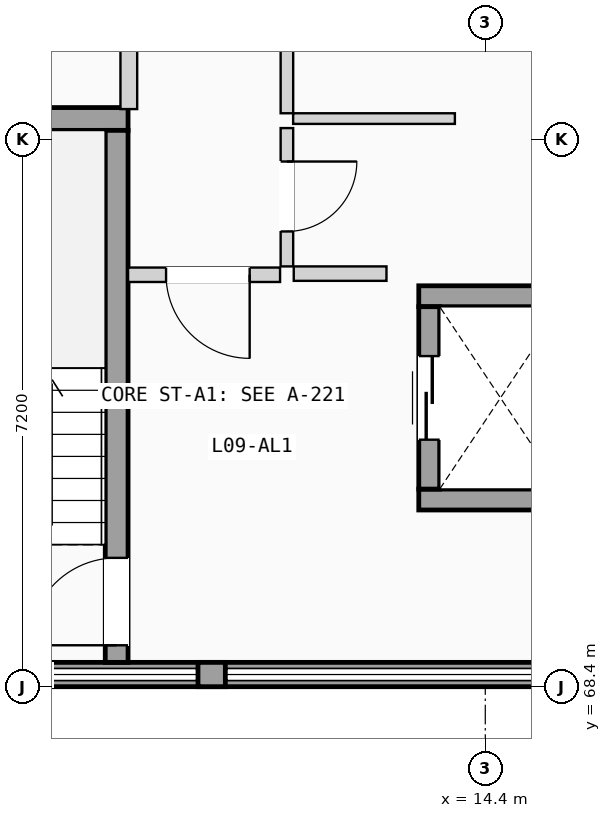
"""IFC4 building model, lengths in metres.
Left out: names, types, materials, properties, quantities, classifications, styles, units other than length and angle.
Written with IfcOpenShell. Run it as: python <this file> out.ifc"""

import sys

from ifc_helpers import new_model, si_unit, direction, frame, frame_2d, origin, place, context, subcontext, project, spatial, rectangle, extrude, element, fill, save


model = new_model("IFC4")
c1 = context("Model", 3, precision=1e-05, world=origin(), true_north=direction((0.0, 1.0)))
c2 = subcontext(c1, "Body", "Model", "MODEL_VIEW")
j1 = project(units=[si_unit("LENGTHUNIT", "METRE"), si_unit("PLANEANGLEUNIT", "RADIAN")], contexts=[c1])
p1 = place(None, origin())
s1 = spatial("IfcSite", under=j1, at=p1, CompositionType="ELEMENT")
p2 = place(p1, origin())
s2 = spatial("IfcBuilding", under=s1, at=p2, CompositionType="ELEMENT")
p3 = place(p2, frame((0.0, 0.0, 30.975)))
s3 = spatial("IfcBuildingStorey", under=s2, at=p3, CompositionType="ELEMENT", Elevation=30.975)
p4 = place(p3, frame((0.0, 68.56, 0.0), z_axis=(0.0, 0.0, 1.0), x_axis=(1.0, 0.0, 0.0)))
e1 = element("IfcWall", 1, at=p4, inside=s3, PredefinedType="SOLIDWALL", context=c2, shape_type="SweptSolid", body=[
    extrude(rectangle(XDim=21.6, YDim=0.32, at=frame_2d((10.8, 0.0))), origin(), (0.0, 0.0, 1.0), 1.11),
])
p5 = place(p3, frame((10.62, 68.56, 1.11), z_axis=(0.0, 0.0, 1.0), x_axis=(1.0, 0.0, 0.0)))
e2 = element("IfcWall", 2, at=p5, inside=s3, PredefinedType="SOLIDWALL", context=c2, shape_type="SweptSolid", body=[
    extrude(rectangle(XDim=0.36, YDim=0.32, at=frame_2d((0.18, 0.0))), origin(), (0.0, 0.0, 1.0), 1.79),
])
p6 = place(p3, frame((5.7, 75.87, 0.0), z_axis=(0.0, 0.0, 1.0), x_axis=(1.0, 0.0, 0.0)))
e3 = element("IfcWall", 3, at=p6, inside=s3, PredefinedType="SHEAR", context=c2, shape_type="SweptSolid", body=[
    extrude(rectangle(XDim=4.0, YDim=0.3, at=frame_2d((2.0, 0.0))), origin(), (0.0, 0.0, 1.0), 2.9),
])
p7 = place(p3, frame((9.55, 68.72, 0.0), z_axis=(0.0, 0.0, 1.0), x_axis=(0.0, 1.0, 0.0)))
e4 = element("IfcWall", 4, at=p7, inside=s3, PredefinedType="SHEAR", context=c2, shape_type="SweptSolid", body=[
    extrude(rectangle(XDim=7.0, YDim=0.3, at=frame_2d((3.5, 0.0))), origin(), (0.0, 0.0, 1.0), 2.9),
])
p8 = place(p7, frame((0.225, 0.0, 0.0)))
e5 = element("IfcOpeningElement", 5, at=p8, cuts=e4, PredefinedType="OPENING", context=c2, shape_type="SweptSolid", body=[
    extrude(rectangle(XDim=1.15, YDim=2.12, at=frame_2d((0.575, 1.06))), frame((0.0, 0.16, 0.0), z_axis=(0.0, -1.0, 0.0), x_axis=(1.0, 0.0, 0.0)), (0.0, 0.0, 1.0), 0.32),
])
for number, where, z_axis, x_axis in (
    (6, (13.525, 70.863, 0.0), (0.0, 0.0, 1.0), (1.0, 0.0, 0.0)),
    (7, (13.525, 73.538, 0.0), (0.0, 0.0, 1.0), (1.0, 0.0, 0.0)),
):
    element("IfcWall", number, at=place(p3, frame(where, z_axis=z_axis, x_axis=x_axis)), inside=s3, PredefinedType="SHEAR", context=c2, shape_type="SweptSolid", body=[
        extrude(rectangle(XDim=2.15, YDim=0.275, at=frame_2d((1.075, 0.0))), origin(), (0.0, 0.0, 1.0), 2.9),
    ])
p9 = place(p3, frame((13.663, 71.0, 0.0), z_axis=(0.0, 0.0, 1.0), x_axis=(0.0, 1.0, 0.0)))
e8 = element("IfcWall", 8, at=p9, inside=s3, PredefinedType="SHEAR", context=c2, shape_type="SweptSolid", body=[
    extrude(rectangle(XDim=2.4, YDim=0.275, at=frame_2d((1.2, 0.0))), origin(), (0.0, 0.0, 1.0), 2.9),
])
p10 = place(p9, frame((0.65, 0.0, 0.0)))
e9 = element("IfcOpeningElement", 9, at=p10, cuts=e8, PredefinedType="OPENING", context=c2, shape_type="SweptSolid", body=[
    extrude(rectangle(XDim=1.1, YDim=2.15, at=frame_2d((0.55, 1.075))), frame((0.0, 0.147, 0.0), z_axis=(0.0, -1.0, 0.0), x_axis=(1.0, 0.0, 0.0)), (0.0, 0.0, 1.0), 0.295),
])
p11 = place(p3, frame((11.88, 73.835, 0.0), z_axis=(0.0, 0.0, 1.0), x_axis=(1.0, 0.0, 0.0)))
e10 = element("IfcWall", 10, at=p11, inside=s3, PredefinedType="PARTITIONING", context=c2, shape_type="SweptSolid", body=[
    extrude(rectangle(XDim=1.22, YDim=0.19, at=frame_2d((0.61, 0.0))), origin(), (0.0, 0.0, 1.0), 2.87),
])
p12 = place(p3, frame((9.7, 73.82, 0.0), z_axis=(0.0, 0.0, 1.0), x_axis=(1.0, 0.0, 0.0)))
e11 = element("IfcWall", 11, at=p12, inside=s3, PredefinedType="PARTITIONING", context=c2, shape_type="SweptSolid", body=[
    extrude(rectangle(XDim=2.0, YDim=0.19, at=frame_2d((1.0, 0.0))), origin(), (0.0, 0.0, 1.0), 2.87),
])
p13 = place(p12, frame((0.5, 0.0, 0.0)))
e12 = element("IfcOpeningElement", 12, at=p13, cuts=e11, PredefinedType="OPENING", context=c2, shape_type="SweptSolid", body=[
    extrude(rectangle(XDim=1.1, YDim=2.12, at=frame_2d((0.55, 1.06))), frame((0.0, 0.105, 0.0), z_axis=(0.0, -1.0, 0.0), x_axis=(1.0, 0.0, 0.0)), (0.0, 0.0, 1.0), 0.21),
])
p14 = place(p3, frame((11.79, 73.93, 0.0), z_axis=(0.0, 0.0, 1.0), x_axis=(0.0, 1.0, 0.0)))
e13 = element("IfcWall", 13, at=p14, inside=s3, PredefinedType="PARTITIONING", context=c2, shape_type="SweptSolid", body=[
    extrude(rectangle(XDim=1.82, YDim=0.165, at=frame_2d((0.91, 0.0))), origin(), (0.0, 0.0, 1.0), 2.87),
])
p15 = place(p14, frame((0.46, 0.0, 0.0)))
e14 = element("IfcOpeningElement", 14, at=p15, cuts=e13, PredefinedType="OPENING", context=c2, shape_type="SweptSolid", body=[
    extrude(rectangle(XDim=0.92, YDim=2.04, at=frame_2d((0.46, 1.02))), frame((0.0, 0.093, 0.0), z_axis=(0.0, -1.0, 0.0), x_axis=(1.0, 0.0, 0.0)), (0.0, 0.0, 1.0), 0.185),
])
p16 = place(p3, frame((11.872, 75.875, 0.0), z_axis=(0.0, 0.0, 1.0), x_axis=(1.0, 0.0, 0.0)))
e15 = element("IfcWall", 15, at=p16, inside=s3, PredefinedType="PARTITIONING", context=c2, shape_type="SweptSolid", body=[
    extrude(rectangle(XDim=2.128, YDim=0.14, at=frame_2d((1.064, 0.0))), origin(), (0.0, 0.0, 1.0), 2.87),
])
p17 = place(p3, frame((9.71, 76.0, 0.0), z_axis=(0.0, 0.0, 1.0), x_axis=(0.0, 1.0, 0.0)))
e16 = element("IfcWall", 16, at=p17, inside=s3, PredefinedType="PLUMBINGWALL", context=c2, shape_type="SweptSolid", body=[
    extrude(rectangle(XDim=4.039, YDim=0.22, at=frame_2d((2.02, 0.0))), origin(), (0.0, 0.0, 1.0), 2.87),
])
p18 = place(p3, frame((11.79, 75.945, 0.0), z_axis=(0.0, 0.0, 1.0), x_axis=(0.0, 1.0, 0.0)))
e17 = element("IfcWall", 17, at=p18, inside=s3, PredefinedType="PARTITIONING", context=c2, shape_type="SweptSolid", body=[
    extrude(rectangle(XDim=6.608, YDim=0.165, at=frame_2d((3.304, 0.0))), origin(), (0.0, 0.0, 1.0), 2.87),
])
p19 = place(p18, frame((2.842, 0.0, 0.0)))
e18 = element("IfcOpeningElement", 18, at=p19, cuts=e17, PredefinedType="OPENING", context=c2, shape_type="SweptSolid", body=[
    extrude(rectangle(XDim=0.98, YDim=2.08, at=frame_2d((0.49, 1.04))), frame((0.0, 0.093, 0.0), z_axis=(0.0, -1.0, 0.0), x_axis=(1.0, 0.0, 0.0)), (0.0, 0.0, 1.0), 0.185),
])
p20 = place(p8, origin())
e19 = element("IfcDoor", 19, at=p20, inside=s3, OperationType="SINGLE_SWING_LEFT", PredefinedType="DOOR", context=c2, shape_type="SweptSolid", body=[
    extrude(rectangle(XDim=1.15, YDim=2.12, at=frame_2d((0.575, 1.06))), frame((0.0, 0.025, 0.0), z_axis=(0.0, -1.0, 0.0), x_axis=(1.0, 0.0, 0.0)), (0.0, 0.0, 1.0), 0.05),
])
fill(e5, e19)
p21 = place(p10, origin())
e20 = element("IfcDoor", 20, at=p21, inside=s3, OperationType="SLIDING_TO_LEFT", PredefinedType="DOOR", context=c2, shape_type="SweptSolid", body=[
    extrude(rectangle(XDim=1.1, YDim=2.15, at=frame_2d((0.55, 1.075))), frame((0.0, 0.025, 0.0), z_axis=(0.0, -1.0, 0.0), x_axis=(1.0, 0.0, 0.0)), (0.0, 0.0, 1.0), 0.05),
])
fill(e9, e20)
p22 = place(p13, frame((1.1, 0.0, 0.0), z_axis=(0.0, 0.0, 1.0), x_axis=(-1.0, 0.0, 0.0)))
e21 = element("IfcDoor", 21, at=p22, inside=s3, OperationType="SINGLE_SWING_RIGHT", PredefinedType="DOOR", context=c2, shape_type="SweptSolid", body=[
    extrude(rectangle(XDim=1.1, YDim=2.12, at=frame_2d((0.55, 1.06))), frame((0.0, 0.025, 0.0), z_axis=(0.0, -1.0, 0.0), x_axis=(1.0, 0.0, 0.0)), (0.0, 0.0, 1.0), 0.05),
])
fill(e12, e21)
p23 = place(p15, frame((0.92, 0.0, 0.0), z_axis=(0.0, 0.0, 1.0), x_axis=(-1.0, 0.0, 0.0)))
e22 = element("IfcDoor", 22, at=p23, inside=s3, OperationType="SINGLE_SWING_RIGHT", PredefinedType="DOOR", context=c2, shape_type="SweptSolid", body=[
    extrude(rectangle(XDim=0.92, YDim=2.04, at=frame_2d((0.46, 1.02))), frame((0.0, 0.025, 0.0), z_axis=(0.0, -1.0, 0.0), x_axis=(1.0, 0.0, 0.0)), (0.0, 0.0, 1.0), 0.05),
])
fill(e14, e22)
save(model, sys.argv[1])
